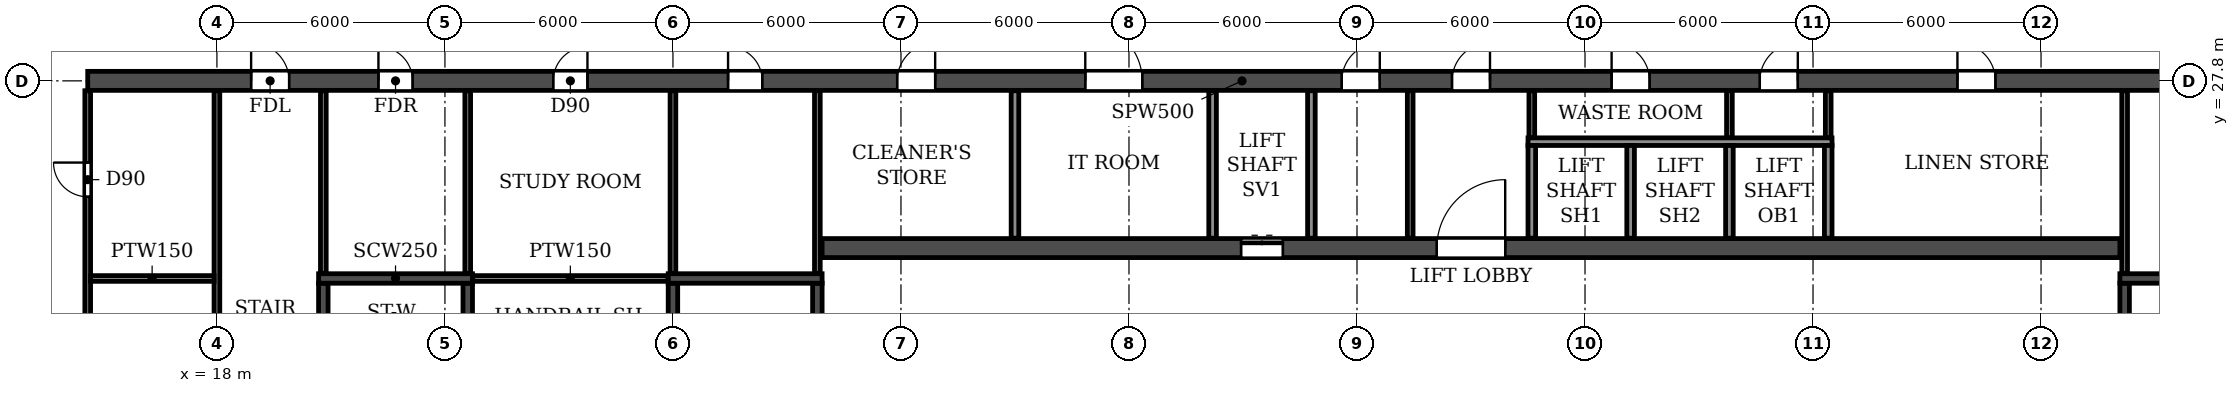
"""IFC4 building model, lengths in metres.
Left out: names, types, materials, properties, quantities, classifications, styles, units other than length and angle.
Written with IfcOpenShell. Run it as: python <this file> out.ifc"""

import sys

from ifc_helpers import new_model, si_unit, direction, frame, frame_2d, origin, place, context, subcontext, project, spatial, rectangle, extrude, element, fill, save


model = new_model("IFC4")
c1 = context("Model", 3, precision=1e-05, world=origin(), true_north=direction((0.0, 1.0)))
c2 = subcontext(c1, "Body", "Model", "MODEL_VIEW")
j1 = project(units=[si_unit("LENGTHUNIT", "METRE"), si_unit("PLANEANGLEUNIT", "RADIAN")], contexts=[c1])
p1 = place(None, origin())
s1 = spatial("IfcSite", under=j1, at=p1, CompositionType="ELEMENT")
p2 = place(p1, origin())
s2 = spatial("IfcBuilding", under=s1, at=p2, CompositionType="ELEMENT")
p3 = place(p2, frame((0.0, 0.0, 105.9)))
s3 = spatial("IfcBuildingStorey", under=s2, at=p3, CompositionType="ELEMENT", Elevation=105.9)
p4 = place(p3, frame((14.6, 27.8, 0.0), z_axis=(0.0, 0.0, 1.0), x_axis=(1.0, 0.0, 0.0)))
e1 = element("IfcWall", 1, at=p4, inside=s3, PredefinedType="SOLIDWALL", context=c2, shape_type="SweptSolid", body=[
    extrude(rectangle(XDim=72.8, YDim=0.5, at=frame_2d((36.4, 0.0))), origin(), (0.0, 0.0, 1.0), 3.06),
])
p5 = place(p4, frame((4.3, 0.0, 0.0)))
e2 = element("IfcOpeningElement", 2, at=p5, cuts=e1, PredefinedType="OPENING", context=c2, shape_type="SweptSolid", body=[
    extrude(rectangle(XDim=1.0, YDim=2.1, at=frame_2d((0.5, 1.05))), frame((0.0, 0.26, 0.0), z_axis=(0.0, -1.0, 0.0), x_axis=(1.0, 0.0, 0.0)), (0.0, 0.0, 1.0), 0.52),
])
p6 = place(p4, frame((7.65, 0.0, 0.0)))
e3 = element("IfcOpeningElement", 3, at=p6, cuts=e1, PredefinedType="OPENING", context=c2, shape_type="SweptSolid", body=[
    extrude(rectangle(XDim=0.9, YDim=2.1, at=frame_2d((0.45, 1.05))), frame((0.0, 0.26, 0.0), z_axis=(0.0, -1.0, 0.0), x_axis=(1.0, 0.0, 0.0)), (0.0, 0.0, 1.0), 0.52),
])
p7 = place(p4, frame((12.25, 0.0, 0.0)))
e4 = element("IfcOpeningElement", 4, at=p7, cuts=e1, PredefinedType="OPENING", context=c2, shape_type="SweptSolid", body=[
    extrude(rectangle(XDim=0.9, YDim=2.1, at=frame_2d((0.45, 1.05))), frame((0.0, 0.26, 0.0), z_axis=(0.0, -1.0, 0.0), x_axis=(1.0, 0.0, 0.0)), (0.0, 0.0, 1.0), 0.52),
])
p8 = place(p4, frame((16.85, 0.0, 0.0)))
e5 = element("IfcOpeningElement", 5, at=p8, cuts=e1, PredefinedType="OPENING", context=c2, shape_type="SweptSolid", body=[
    extrude(rectangle(XDim=0.9, YDim=2.1, at=frame_2d((0.45, 1.05))), frame((0.0, 0.26, 0.0), z_axis=(0.0, -1.0, 0.0), x_axis=(1.0, 0.0, 0.0)), (0.0, 0.0, 1.0), 0.52),
])
p9 = place(p4, frame((21.3, 0.0, 0.0)))
e6 = element("IfcOpeningElement", 6, at=p9, cuts=e1, PredefinedType="OPENING", context=c2, shape_type="SweptSolid", body=[
    extrude(rectangle(XDim=1.0, YDim=2.1, at=frame_2d((0.5, 1.05))), frame((0.0, 0.26, 0.0), z_axis=(0.0, -1.0, 0.0), x_axis=(1.0, 0.0, 0.0)), (0.0, 0.0, 1.0), 0.52),
])
p10 = place(p4, frame((26.25, 0.0, 0.0)))
e7 = element("IfcOpeningElement", 7, at=p10, cuts=e1, PredefinedType="OPENING", context=c2, shape_type="SweptSolid", body=[
    extrude(rectangle(XDim=1.5, YDim=2.1, at=frame_2d((0.75, 1.05))), frame((0.0, 0.26, 0.0), z_axis=(0.0, -1.0, 0.0), x_axis=(1.0, 0.0, 0.0)), (0.0, 0.0, 1.0), 0.52),
])
p11 = place(p4, frame((33.0, 0.0, 0.0)))
e8 = element("IfcOpeningElement", 8, at=p11, cuts=e1, PredefinedType="OPENING", context=c2, shape_type="SweptSolid", body=[
    extrude(rectangle(XDim=1.0, YDim=2.1, at=frame_2d((0.5, 1.05))), frame((0.0, 0.26, 0.0), z_axis=(0.0, -1.0, 0.0), x_axis=(1.0, 0.0, 0.0)), (0.0, 0.0, 1.0), 0.52),
])
p12 = place(p4, frame((35.9, 0.0, 0.0)))
e9 = element("IfcOpeningElement", 9, at=p12, cuts=e1, PredefinedType="OPENING", context=c2, shape_type="SweptSolid", body=[
    extrude(rectangle(XDim=1.0, YDim=2.1, at=frame_2d((0.5, 1.05))), frame((0.0, 0.26, 0.0), z_axis=(0.0, -1.0, 0.0), x_axis=(1.0, 0.0, 0.0)), (0.0, 0.0, 1.0), 0.52),
])
p13 = place(p4, frame((40.1, 0.0, 0.0)))
e10 = element("IfcOpeningElement", 10, at=p13, cuts=e1, PredefinedType="OPENING", context=c2, shape_type="SweptSolid", body=[
    extrude(rectangle(XDim=1.0, YDim=2.1, at=frame_2d((0.5, 1.05))), frame((0.0, 0.26, 0.0), z_axis=(0.0, -1.0, 0.0), x_axis=(1.0, 0.0, 0.0)), (0.0, 0.0, 1.0), 0.52),
])
p14 = place(p4, frame((44.0, 0.0, 0.0)))
e11 = element("IfcOpeningElement", 11, at=p14, cuts=e1, PredefinedType="OPENING", context=c2, shape_type="SweptSolid", body=[
    extrude(rectangle(XDim=1.0, YDim=2.1, at=frame_2d((0.5, 1.05))), frame((0.0, 0.26, 0.0), z_axis=(0.0, -1.0, 0.0), x_axis=(1.0, 0.0, 0.0)), (0.0, 0.0, 1.0), 0.52),
])
p15 = place(p4, frame((49.2, 0.0, 0.0)))
e12 = element("IfcOpeningElement", 12, at=p15, cuts=e1, PredefinedType="OPENING", context=c2, shape_type="SweptSolid", body=[
    extrude(rectangle(XDim=1.0, YDim=2.1, at=frame_2d((0.5, 1.05))), frame((0.0, 0.26, 0.0), z_axis=(0.0, -1.0, 0.0), x_axis=(1.0, 0.0, 0.0)), (0.0, 0.0, 1.0), 0.52),
])
p16 = place(p4, frame((55.05, 0.0, 0.0)))
e13 = element("IfcOpeningElement", 13, at=p16, cuts=e1, PredefinedType="OPENING", context=c2, shape_type="SweptSolid", body=[
    extrude(rectangle(XDim=0.9, YDim=2.1, at=frame_2d((0.45, 1.05))), frame((0.0, 0.26, 0.0), z_axis=(0.0, -1.0, 0.0), x_axis=(1.0, 0.0, 0.0)), (0.0, 0.0, 1.0), 0.52),
])
p17 = place(p4, frame((59.65, 0.0, 0.0)))
e14 = element("IfcOpeningElement", 14, at=p17, cuts=e1, PredefinedType="OPENING", context=c2, shape_type="SweptSolid", body=[
    extrude(rectangle(XDim=0.9, YDim=2.1, at=frame_2d((0.45, 1.05))), frame((0.0, 0.26, 0.0), z_axis=(0.0, -1.0, 0.0), x_axis=(1.0, 0.0, 0.0)), (0.0, 0.0, 1.0), 0.52),
])
p18 = place(p4, frame((64.25, 0.0, 0.0)))
e15 = element("IfcOpeningElement", 15, at=p18, cuts=e1, PredefinedType="OPENING", context=c2, shape_type="SweptSolid", body=[
    extrude(rectangle(XDim=0.9, YDim=2.1, at=frame_2d((0.45, 1.05))), frame((0.0, 0.26, 0.0), z_axis=(0.0, -1.0, 0.0), x_axis=(1.0, 0.0, 0.0)), (0.0, 0.0, 1.0), 0.52),
])
p19 = place(p4, frame((67.5, 0.0, 0.0)))
e16 = element("IfcOpeningElement", 16, at=p19, cuts=e1, PredefinedType="OPENING", context=c2, shape_type="SweptSolid", body=[
    extrude(rectangle(XDim=1.0, YDim=2.1, at=frame_2d((0.5, 1.05))), frame((0.0, 0.26, 0.0), z_axis=(0.0, -1.0, 0.0), x_axis=(1.0, 0.0, 0.0)), (0.0, 0.0, 1.0), 0.52),
])
p20 = place(p3, frame((33.925, 23.4, 0.0), z_axis=(0.0, 0.0, 1.0), x_axis=(1.0, 0.0, 0.0)))
e17 = element("IfcWall", 17, at=p20, inside=s3, PredefinedType="SOLIDWALL", context=c2, shape_type="SweptSolid", body=[
    extrude(rectangle(XDim=34.15, YDim=0.5, at=frame_2d((17.075, 0.0))), origin(), (0.0, 0.0, 1.0), 3.06),
])
p21 = place(p20, frame((16.175, 0.0, 0.0)))
e18 = element("IfcOpeningElement", 18, at=p21, cuts=e17, PredefinedType="OPENING", context=c2, shape_type="SweptSolid", body=[
    extrude(rectangle(XDim=1.8, YDim=2.1, at=frame_2d((0.9, 1.05))), frame((0.0, 0.26, 0.0), z_axis=(0.0, -1.0, 0.0), x_axis=(1.0, 0.0, 0.0)), (0.0, 0.0, 1.0), 0.52),
])
p22 = place(p20, frame((11.025, 0.0, 0.0)))
e19 = element("IfcOpeningElement", 19, at=p22, cuts=e17, PredefinedType="OPENING", context=c2, shape_type="SweptSolid", body=[
    extrude(rectangle(XDim=1.1, YDim=2.1, at=frame_2d((0.55, 1.05))), frame((0.0, 0.26, 0.0), z_axis=(0.0, -1.0, 0.0), x_axis=(1.0, 0.0, 0.0)), (0.0, 0.0, 1.0), 0.52),
])
p23 = place(p3, frame((30.0, 14.85, 0.0), z_axis=(0.0, 0.0, 1.0), x_axis=(0.0, 1.0, 0.0)))
e20 = element("IfcWall", 20, at=p23, inside=s3, PredefinedType="SOLIDWALL", context=c2, shape_type="SweptSolid", body=[
    extrude(rectangle(XDim=7.625, YDim=0.25, at=frame_2d((3.812, 0.0))), origin(), (0.0, 0.0, 1.0), 3.06),
])
p24 = place(p3, frame((33.8, 14.85, 0.0), z_axis=(0.0, 0.0, 1.0), x_axis=(0.0, 1.0, 0.0)))
e21 = element("IfcWall", 21, at=p24, inside=s3, PredefinedType="SOLIDWALL", context=c2, shape_type="SweptSolid", body=[
    extrude(rectangle(XDim=7.625, YDim=0.25, at=frame_2d((3.812, 0.0))), origin(), (0.0, 0.0, 1.0), 3.06),
])
p25 = place(p24, frame((0.45, 0.0, 0.0)))
e22 = element("IfcOpeningElement", 22, at=p25, cuts=e21, PredefinedType="OPENING", context=c2, shape_type="SweptSolid", body=[
    extrude(rectangle(XDim=1.0, YDim=2.1, at=frame_2d((0.5, 1.05))), frame((0.0, 0.135, 0.0), z_axis=(0.0, -1.0, 0.0), x_axis=(1.0, 0.0, 0.0)), (0.0, 0.0, 1.0), 0.27),
])
p26 = place(p3, frame((29.875, 22.6, 0.0), z_axis=(0.0, 0.0, 1.0), x_axis=(1.0, 0.0, 0.0)))
e23 = element("IfcWall", 23, at=p26, inside=s3, PredefinedType="SOLIDWALL", context=c2, shape_type="SweptSolid", body=[
    extrude(rectangle(XDim=4.05, YDim=0.25, at=frame_2d((2.025, 0.0))), origin(), (0.0, 0.0, 1.0), 3.06),
])
p27 = place(p3, frame((68.2, 14.85, 0.0), z_axis=(0.0, 0.0, 1.0), x_axis=(0.0, 1.0, 0.0)))
e24 = element("IfcWall", 24, at=p27, inside=s3, PredefinedType="SOLIDWALL", context=c2, shape_type="SweptSolid", body=[
    extrude(rectangle(XDim=7.625, YDim=0.25, at=frame_2d((3.812, 0.0))), origin(), (0.0, 0.0, 1.0), 3.06),
])
p28 = place(p27, frame((0.45, 0.0, 0.0)))
e25 = element("IfcOpeningElement", 25, at=p28, cuts=e24, PredefinedType="OPENING", context=c2, shape_type="SweptSolid", body=[
    extrude(rectangle(XDim=1.0, YDim=2.1, at=frame_2d((0.5, 1.05))), frame((0.0, 0.135, 0.0), z_axis=(0.0, -1.0, 0.0), x_axis=(1.0, 0.0, 0.0)), (0.0, 0.0, 1.0), 0.27),
])
p29 = place(p3, frame((68.075, 22.6, 0.0), z_axis=(0.0, 0.0, 1.0), x_axis=(1.0, 0.0, 0.0)))
e26 = element("IfcWall", 26, at=p29, inside=s3, PredefinedType="SOLIDWALL", context=c2, shape_type="SweptSolid", body=[
    extrude(rectangle(XDim=4.05, YDim=0.25, at=frame_2d((2.025, 0.0))), origin(), (0.0, 0.0, 1.0), 3.06),
])
p30 = place(p3, frame((20.8, 14.85, 0.0), z_axis=(0.0, 0.0, 1.0), x_axis=(0.0, 1.0, 0.0)))
e27 = element("IfcWall", 27, at=p30, inside=s3, PredefinedType="SOLIDWALL", context=c2, shape_type="SweptSolid", body=[
    extrude(rectangle(XDim=7.625, YDim=0.25, at=frame_2d((3.812, 0.0))), origin(), (0.0, 0.0, 1.0), 3.06),
])
p31 = place(p30, frame((0.45, 0.0, 0.0)))
e28 = element("IfcOpeningElement", 28, at=p31, cuts=e27, PredefinedType="OPENING", context=c2, shape_type="SweptSolid", body=[
    extrude(rectangle(XDim=1.0, YDim=2.1, at=frame_2d((0.5, 1.05))), frame((0.0, 0.135, 0.0), z_axis=(0.0, -1.0, 0.0), x_axis=(1.0, 0.0, 0.0)), (0.0, 0.0, 1.0), 0.27),
])
p32 = place(p3, frame((24.6, 14.85, 0.0), z_axis=(0.0, 0.0, 1.0), x_axis=(0.0, 1.0, 0.0)))
e29 = element("IfcWall", 29, at=p32, inside=s3, PredefinedType="SOLIDWALL", context=c2, shape_type="SweptSolid", body=[
    extrude(rectangle(XDim=7.625, YDim=0.25, at=frame_2d((3.812, 0.0))), origin(), (0.0, 0.0, 1.0), 3.06),
])
p33 = place(p3, frame((20.675, 22.6, 0.0), z_axis=(0.0, 0.0, 1.0), x_axis=(1.0, 0.0, 0.0)))
e30 = element("IfcWall", 30, at=p33, inside=s3, PredefinedType="SOLIDWALL", context=c2, shape_type="SweptSolid", body=[
    extrude(rectangle(XDim=4.05, YDim=0.25, at=frame_2d((2.025, 0.0))), origin(), (0.0, 0.0, 1.0), 3.06),
])
p34 = place(p3, frame((14.6, 14.86, 0.0), z_axis=(0.0, 0.0, 1.0), x_axis=(0.0, 1.0, 0.0)))
e31 = element("IfcWall", 31, at=p34, inside=s3, PredefinedType="PARTITIONING", context=c2, shape_type="SweptSolid", body=[
    extrude(rectangle(XDim=12.68, YDim=0.15, at=frame_2d((6.34, 0.0))), origin(), (0.0, 0.0, 1.0), 3.06),
])
p35 = place(p34, frame((3.29, 0.0, 0.0)))
e32 = element("IfcOpeningElement", 32, at=p35, cuts=e31, PredefinedType="OPENING", context=c2, shape_type="SweptSolid", body=[
    extrude(rectangle(XDim=0.9, YDim=2.1, at=frame_2d((0.45, 1.05))), frame((0.0, 0.085, 0.0), z_axis=(0.0, -1.0, 0.0), x_axis=(1.0, 0.0, 0.0)), (0.0, 0.0, 1.0), 0.17),
])
p36 = place(p34, frame((9.89, 0.0, 0.0)))
e33 = element("IfcOpeningElement", 33, at=p36, cuts=e31, PredefinedType="OPENING", context=c2, shape_type="SweptSolid", body=[
    extrude(rectangle(XDim=0.9, YDim=2.1, at=frame_2d((0.45, 1.05))), frame((0.0, 0.085, 0.0), z_axis=(0.0, -1.0, 0.0), x_axis=(1.0, 0.0, 0.0)), (0.0, 0.0, 1.0), 0.17),
])
p37 = place(p3, frame((18.0, 14.86, 0.0), z_axis=(0.0, 0.0, 1.0), x_axis=(0.0, 1.0, 0.0)))
e34 = element("IfcWall", 34, at=p37, inside=s3, PredefinedType="PARTITIONING", context=c2, shape_type="SweptSolid", body=[
    extrude(rectangle(XDim=12.68, YDim=0.15, at=frame_2d((6.34, 0.0))), origin(), (0.0, 0.0, 1.0), 3.06),
])
p38 = place(p3, frame((49.4, 23.66, 0.0), z_axis=(0.0, 0.0, 1.0), x_axis=(0.0, 1.0, 0.0)))
e35 = element("IfcWall", 35, at=p38, inside=s3, PredefinedType="PARTITIONING", context=c2, shape_type="SweptSolid", body=[
    extrude(rectangle(XDim=3.88, YDim=0.15, at=frame_2d((1.94, 0.0))), origin(), (0.0, 0.0, 1.0), 3.06),
])
p39 = place(p3, frame((52.6, 26.3, 0.0), z_axis=(0.0, 0.0, 1.0), x_axis=(0.0, 1.0, 0.0)))
e36 = element("IfcWall", 36, at=p39, inside=s3, PredefinedType="PARTITIONING", context=c2, shape_type="SweptSolid", body=[
    extrude(rectangle(XDim=1.24, YDim=0.15, at=frame_2d((0.62, 0.0))), origin(), (0.0, 0.0, 1.0), 3.06),
])
p40 = place(p3, frame((14.675, 22.6, 0.0), z_axis=(0.0, 0.0, 1.0), x_axis=(1.0, 0.0, 0.0)))
e37 = element("IfcWall", 37, at=p40, inside=s3, PredefinedType="PARTITIONING", context=c2, shape_type="SweptSolid", body=[
    extrude(rectangle(XDim=3.25, YDim=0.15, at=frame_2d((1.625, 0.0))), origin(), (0.0, 0.0, 1.0), 3.06),
])
p41 = place(p3, frame((24.735, 22.6, 0.0), z_axis=(0.0, 0.0, 1.0), x_axis=(1.0, 0.0, 0.0)))
e38 = element("IfcWall", 38, at=p41, inside=s3, PredefinedType="PARTITIONING", context=c2, shape_type="SweptSolid", body=[
    extrude(rectangle(XDim=5.13, YDim=0.15, at=frame_2d((2.565, 0.0))), origin(), (0.0, 0.0, 1.0), 3.06),
])
for number, where, z_axis, x_axis in (
    (39, (57.8, 26.3, 0.0), (0.0, 0.0, 1.0), (0.0, 1.0, 0.0)),
    (40, (60.4, 26.3, 0.0), (0.0, 0.0, 1.0), (0.0, 1.0, 0.0)),
):
    element("IfcWall", number, at=place(p3, frame(where, z_axis=z_axis, x_axis=x_axis)), inside=s3, PredefinedType="PARTITIONING", context=c2, shape_type="SweptSolid", body=[
        extrude(rectangle(XDim=1.24, YDim=0.15, at=frame_2d((0.62, 0.0))), origin(), (0.0, 0.0, 1.0), 3.06),
    ])
p42 = place(p3, frame((39.0, 23.66, 0.0), z_axis=(0.0, 0.0, 1.0), x_axis=(0.0, 1.0, 0.0)))
e41 = element("IfcWall", 41, at=p42, inside=s3, PredefinedType="PARTITIONING", context=c2, shape_type="SweptSolid", body=[
    extrude(rectangle(XDim=3.88, YDim=0.2, at=frame_2d((1.94, 0.0))), origin(), (0.0, 0.0, 1.0), 3.06),
])
for number, where, z_axis, x_axis in (
    (42, (20.8, 22.735, 0.0), (0.0, 0.0, 1.0), (0.0, 1.0, 0.0)),
    (43, (24.6, 22.735, 0.0), (0.0, 0.0, 1.0), (0.0, 1.0, 0.0)),
    (44, (30.0, 22.735, 0.0), (0.0, 0.0, 1.0), (0.0, 1.0, 0.0)),
    (45, (33.8, 22.735, 0.0), (0.0, 0.0, 1.0), (0.0, 1.0, 0.0)),
    (46, (68.2, 22.735, 0.0), (0.0, 0.0, 1.0), (0.0, 1.0, 0.0)),
):
    element("IfcWall", number, at=place(p3, frame(where, z_axis=z_axis, x_axis=x_axis)), inside=s3, PredefinedType="PARTITIONING", context=c2, shape_type="SweptSolid", body=[
        extrude(rectangle(XDim=4.805, YDim=0.15, at=frame_2d((2.402, 0.0))), origin(), (0.0, 0.0, 1.0), 3.06),
    ])
p43 = place(p3, frame((52.5, 26.2, 0.0), z_axis=(0.0, 0.0, 1.0), x_axis=(1.0, 0.0, 0.0)))
e47 = element("IfcWall", 47, at=p43, inside=s3, PredefinedType="PARTITIONING", context=c2, shape_type="SweptSolid", body=[
    extrude(rectangle(XDim=8.0, YDim=0.2, at=frame_2d((4.0, 0.0))), origin(), (0.0, 0.0, 1.0), 3.06),
])
for number, where, z_axis, x_axis in (
    (48, (44.2, 23.66, 0.0), (0.0, 0.0, 1.0), (0.0, 1.0, 0.0)),
    (49, (46.8, 23.66, 0.0), (0.0, 0.0, 1.0), (0.0, 1.0, 0.0)),
):
    element("IfcWall", number, at=place(p3, frame(where, z_axis=z_axis, x_axis=x_axis)), inside=s3, PredefinedType="PARTITIONING", context=c2, shape_type="SweptSolid", body=[
        extrude(rectangle(XDim=3.88, YDim=0.2, at=frame_2d((1.94, 0.0))), origin(), (0.0, 0.0, 1.0), 3.06),
    ])
for number, where, z_axis, x_axis in (
    (50, (52.6, 23.66, 0.0), (0.0, 0.0, 1.0), (0.0, 1.0, 0.0)),
    (51, (55.2, 23.66, 0.0), (0.0, 0.0, 1.0), (0.0, 1.0, 0.0)),
    (52, (57.8, 23.66, 0.0), (0.0, 0.0, 1.0), (0.0, 1.0, 0.0)),
    (53, (60.4, 23.66, 0.0), (0.0, 0.0, 1.0), (0.0, 1.0, 0.0)),
):
    element("IfcWall", number, at=place(p3, frame(where, z_axis=z_axis, x_axis=x_axis)), inside=s3, PredefinedType="PARTITIONING", context=c2, shape_type="SweptSolid", body=[
        extrude(rectangle(XDim=2.44, YDim=0.2, at=frame_2d((1.22, 0.0))), origin(), (0.0, 0.0, 1.0), 3.06),
    ])
p44 = place(p5, origin())
e54 = element("IfcDoor", 54, at=p44, inside=s3, OperationType="SINGLE_SWING_LEFT", PredefinedType="DOOR", context=c2, shape_type="SweptSolid", body=[
    extrude(rectangle(XDim=1.0, YDim=2.1, at=frame_2d((0.5, 1.05))), frame((0.0, 0.025, 0.0), z_axis=(0.0, -1.0, 0.0), x_axis=(1.0, 0.0, 0.0)), (0.0, 0.0, 1.0), 0.05),
])
fill(e2, e54)
p45 = place(p6, origin())
e55 = element("IfcDoor", 55, at=p45, inside=s3, OperationType="SINGLE_SWING_LEFT", PredefinedType="DOOR", context=c2, shape_type="SweptSolid", body=[
    extrude(rectangle(XDim=0.9, YDim=2.1, at=frame_2d((0.45, 1.05))), frame((0.0, 0.025, 0.0), z_axis=(0.0, -1.0, 0.0), x_axis=(1.0, 0.0, 0.0)), (0.0, 0.0, 1.0), 0.05),
])
fill(e3, e55)
p46 = place(p7, origin())
e56 = element("IfcDoor", 56, at=p46, inside=s3, OperationType="SINGLE_SWING_RIGHT", PredefinedType="DOOR", context=c2, shape_type="SweptSolid", body=[
    extrude(rectangle(XDim=0.9, YDim=2.1, at=frame_2d((0.45, 1.05))), frame((0.0, 0.025, 0.0), z_axis=(0.0, -1.0, 0.0), x_axis=(1.0, 0.0, 0.0)), (0.0, 0.0, 1.0), 0.05),
])
fill(e4, e56)
p47 = place(p8, origin())
e57 = element("IfcDoor", 57, at=p47, inside=s3, OperationType="SINGLE_SWING_LEFT", PredefinedType="DOOR", context=c2, shape_type="SweptSolid", body=[
    extrude(rectangle(XDim=0.9, YDim=2.1, at=frame_2d((0.45, 1.05))), frame((0.0, 0.025, 0.0), z_axis=(0.0, -1.0, 0.0), x_axis=(1.0, 0.0, 0.0)), (0.0, 0.0, 1.0), 0.05),
])
fill(e5, e57)
p48 = place(p9, origin())
e58 = element("IfcDoor", 58, at=p48, inside=s3, OperationType="SINGLE_SWING_RIGHT", PredefinedType="DOOR", context=c2, shape_type="SweptSolid", body=[
    extrude(rectangle(XDim=1.0, YDim=2.1, at=frame_2d((0.5, 1.05))), frame((0.0, 0.025, 0.0), z_axis=(0.0, -1.0, 0.0), x_axis=(1.0, 0.0, 0.0)), (0.0, 0.0, 1.0), 0.05),
])
fill(e6, e58)
p49 = place(p10, origin())
e59 = element("IfcDoor", 59, at=p49, inside=s3, OperationType="DOUBLE_DOOR_SINGLE_SWING", PredefinedType="DOOR", context=c2, shape_type="SweptSolid", body=[
    extrude(rectangle(XDim=1.5, YDim=2.1, at=frame_2d((0.75, 1.05))), frame((0.0, 0.025, 0.0), z_axis=(0.0, -1.0, 0.0), x_axis=(1.0, 0.0, 0.0)), (0.0, 0.0, 1.0), 0.05),
])
fill(e7, e59)
p50 = place(p11, origin())
e60 = element("IfcDoor", 60, at=p50, inside=s3, OperationType="SINGLE_SWING_RIGHT", PredefinedType="DOOR", context=c2, shape_type="SweptSolid", body=[
    extrude(rectangle(XDim=1.0, YDim=2.1, at=frame_2d((0.5, 1.05))), frame((0.0, 0.025, 0.0), z_axis=(0.0, -1.0, 0.0), x_axis=(1.0, 0.0, 0.0)), (0.0, 0.0, 1.0), 0.05),
])
fill(e8, e60)
p51 = place(p12, origin())
e61 = element("IfcDoor", 61, at=p51, inside=s3, OperationType="SINGLE_SWING_RIGHT", PredefinedType="DOOR", context=c2, shape_type="SweptSolid", body=[
    extrude(rectangle(XDim=1.0, YDim=2.1, at=frame_2d((0.5, 1.05))), frame((0.0, 0.025, 0.0), z_axis=(0.0, -1.0, 0.0), x_axis=(1.0, 0.0, 0.0)), (0.0, 0.0, 1.0), 0.05),
])
fill(e9, e61)
p52 = place(p13, origin())
e62 = element("IfcDoor", 62, at=p52, inside=s3, OperationType="SINGLE_SWING_LEFT", PredefinedType="DOOR", context=c2, shape_type="SweptSolid", body=[
    extrude(rectangle(XDim=1.0, YDim=2.1, at=frame_2d((0.5, 1.05))), frame((0.0, 0.025, 0.0), z_axis=(0.0, -1.0, 0.0), x_axis=(1.0, 0.0, 0.0)), (0.0, 0.0, 1.0), 0.05),
])
fill(e10, e62)
p53 = place(p14, origin())
e63 = element("IfcDoor", 63, at=p53, inside=s3, OperationType="SINGLE_SWING_RIGHT", PredefinedType="DOOR", context=c2, shape_type="SweptSolid", body=[
    extrude(rectangle(XDim=1.0, YDim=2.1, at=frame_2d((0.5, 1.05))), frame((0.0, 0.025, 0.0), z_axis=(0.0, -1.0, 0.0), x_axis=(1.0, 0.0, 0.0)), (0.0, 0.0, 1.0), 0.05),
])
fill(e11, e63)
p54 = place(p15, origin())
e64 = element("IfcDoor", 64, at=p54, inside=s3, OperationType="SINGLE_SWING_LEFT", PredefinedType="DOOR", context=c2, shape_type="SweptSolid", body=[
    extrude(rectangle(XDim=1.0, YDim=2.1, at=frame_2d((0.5, 1.05))), frame((0.0, 0.025, 0.0), z_axis=(0.0, -1.0, 0.0), x_axis=(1.0, 0.0, 0.0)), (0.0, 0.0, 1.0), 0.05),
])
fill(e12, e64)
p55 = place(p36, origin())
e65 = element("IfcDoor", 65, at=p55, inside=s3, OperationType="SINGLE_SWING_RIGHT", PredefinedType="DOOR", context=c2, shape_type="SweptSolid", body=[
    extrude(rectangle(XDim=0.9, YDim=2.1, at=frame_2d((0.45, 1.05))), frame((0.0, 0.025, 0.0), z_axis=(0.0, -1.0, 0.0), x_axis=(1.0, 0.0, 0.0)), (0.0, 0.0, 1.0), 0.05),
])
fill(e33, e65)
p56 = place(p21, origin())
e66 = element("IfcDoor", 66, at=p56, inside=s3, OperationType="DOUBLE_DOOR_SINGLE_SWING", PredefinedType="DOOR", context=c2, shape_type="SweptSolid", body=[
    extrude(rectangle(XDim=1.8, YDim=2.1, at=frame_2d((0.9, 1.05))), frame((0.0, 0.025, 0.0), z_axis=(0.0, -1.0, 0.0), x_axis=(1.0, 0.0, 0.0)), (0.0, 0.0, 1.0), 0.05),
])
fill(e18, e66)
p57 = place(p22, origin())
e67 = element("IfcDoor", 67, at=p57, inside=s3, OperationType="DOUBLE_DOOR_SLIDING", PredefinedType="DOOR", context=c2, shape_type="SweptSolid", body=[
    extrude(rectangle(XDim=1.1, YDim=2.1, at=frame_2d((0.55, 1.05))), frame((0.0, 0.025, 0.0), z_axis=(0.0, -1.0, 0.0), x_axis=(1.0, 0.0, 0.0)), (0.0, 0.0, 1.0), 0.05),
])
fill(e19, e67)
save(model, sys.argv[1])
